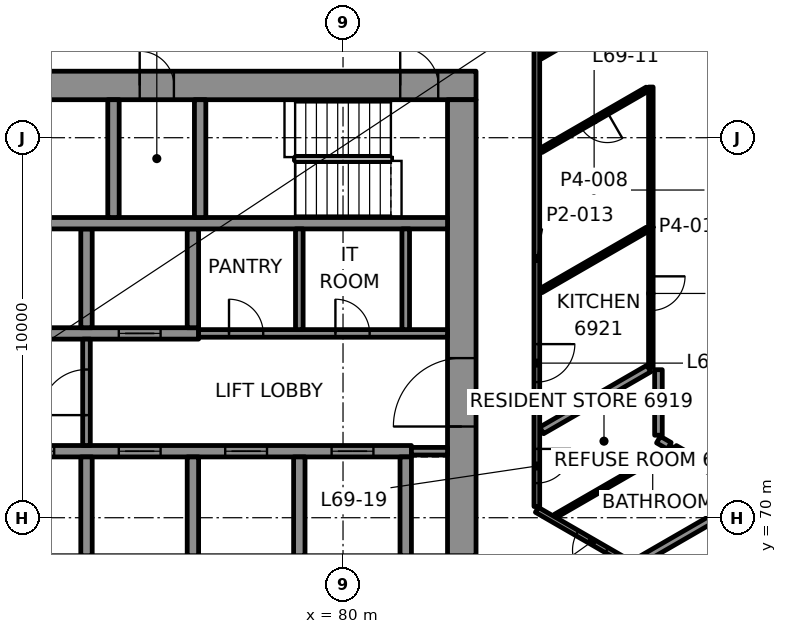
"""IFC4 building model, lengths in metres.
Left out: names, types, materials, properties, quantities, classifications, styles, units other than length and angle.
Written with IfcOpenShell. Run it as: python <this file> out.ifc"""

import sys

from ifc_helpers import new_model, si_unit, direction, frame, frame_2d, origin, place, context, subcontext, project, spatial, rectangle, extrude, element, fill, save


model = new_model("IFC4")
c1 = context("Model", 3, precision=1e-05, world=origin(), true_north=direction((0.0, 1.0)))
c2 = subcontext(c1, "Body", "Model", "MODEL_VIEW")
j1 = project(units=[si_unit("LENGTHUNIT", "METRE"), si_unit("PLANEANGLEUNIT", "RADIAN")], contexts=[c1])
p1 = place(None, origin())
s1 = spatial("IfcSite", under=j1, at=p1, CompositionType="ELEMENT")
p2 = place(p1, origin())
s2 = spatial("IfcBuilding", under=s1, at=p2, CompositionType="ELEMENT")
p3 = place(p2, frame((0.0, 0.0, 288.1)))
s3 = spatial("IfcBuildingStorey", under=s2, at=p3, CompositionType="ELEMENT", Elevation=288.1)
p4 = place(p3, frame((66.5, 81.375, 0.0), z_axis=(0.0, 0.0, 1.0), x_axis=(1.0, 0.0, 0.0)))
e1 = element("IfcWall", 1, at=p4, inside=s3, PredefinedType="SHEAR", context=c2, shape_type="SweptSolid", body=[
    extrude(rectangle(XDim=17.0, YDim=0.75, at=frame_2d((8.5, 0.0))), origin(), (0.0, 0.0, 1.0), 3.3),
])
p5 = place(p4, frame((1.195, 0.0, 0.0)))
e2 = element("IfcOpeningElement", 2, at=p5, cuts=e1, PredefinedType="OPENING", context=c2, shape_type="SweptSolid", body=[
    extrude(rectangle(XDim=1.0, YDim=2.1, at=frame_2d((0.5, 1.05))), frame((0.0, 0.385, 0.0), z_axis=(0.0, -1.0, 0.0), x_axis=(1.0, 0.0, 0.0)), (0.0, 0.0, 1.0), 0.77),
])
p6 = place(p4, frame((15.005, 0.0, 0.0)))
e3 = element("IfcOpeningElement", 3, at=p6, cuts=e1, PredefinedType="OPENING", context=c2, shape_type="SweptSolid", body=[
    extrude(rectangle(XDim=1.0, YDim=2.1, at=frame_2d((0.5, 1.05))), frame((0.0, 0.385, 0.0), z_axis=(0.0, -1.0, 0.0), x_axis=(1.0, 0.0, 0.0)), (0.0, 0.0, 1.0), 0.77),
])
p7 = place(p4, frame((8.15, 0.0, 0.0)))
e4 = element("IfcOpeningElement", 4, at=p7, cuts=e1, PredefinedType="OPENING", context=c2, shape_type="SweptSolid", body=[
    extrude(rectangle(XDim=0.9, YDim=2.1, at=frame_2d((0.45, 1.05))), frame((0.0, 0.385, 0.0), z_axis=(0.0, -1.0, 0.0), x_axis=(1.0, 0.0, 0.0)), (0.0, 0.0, 1.0), 0.77),
])
p8 = place(p3, frame((83.125, 69.0, 0.0), z_axis=(0.0, 0.0, 1.0), x_axis=(0.0, 1.0, 0.0)))
e5 = element("IfcWall", 5, at=p8, inside=s3, PredefinedType="SHEAR", context=c2, shape_type="SweptSolid", body=[
    extrude(rectangle(XDim=12.0, YDim=0.75, at=frame_2d((6.0, 0.0))), origin(), (0.0, 0.0, 1.0), 3.3),
])
p9 = place(p8, frame((3.4, 0.0, 0.0)))
e6 = element("IfcOpeningElement", 6, at=p9, cuts=e5, PredefinedType="OPENING", context=c2, shape_type="SweptSolid", body=[
    extrude(rectangle(XDim=1.8, YDim=2.1, at=frame_2d((0.9, 1.05))), frame((0.0, 0.385, 0.0), z_axis=(0.0, -1.0, 0.0), x_axis=(1.0, 0.0, 0.0)), (0.0, 0.0, 1.0), 0.77),
])
p10 = place(p3, frame((70.3, 71.75, 0.0), z_axis=(0.0, 0.0, 1.0), x_axis=(1.0, 0.0, 0.0)))
e7 = element("IfcWall", 7, at=p10, inside=s3, PredefinedType="SHEAR", context=c2, shape_type="SweptSolid", body=[
    extrude(rectangle(XDim=11.5, YDim=0.3, at=frame_2d((5.75, 0.0))), origin(), (0.0, 0.0, 1.0), 3.3),
])
p11 = place(p10, frame((1.0, 0.0, 0.0)))
e8 = element("IfcOpeningElement", 8, at=p11, cuts=e7, PredefinedType="OPENING", context=c2, shape_type="SweptSolid", body=[
    extrude(rectangle(XDim=1.1, YDim=2.1, at=frame_2d((0.55, 1.05))), frame((0.0, 0.16, 0.0), z_axis=(0.0, -1.0, 0.0), x_axis=(1.0, 0.0, 0.0)), (0.0, 0.0, 1.0), 0.32),
])
p12 = place(p10, frame((3.8, 0.0, 0.0)))
e9 = element("IfcOpeningElement", 9, at=p12, cuts=e7, PredefinedType="OPENING", context=c2, shape_type="SweptSolid", body=[
    extrude(rectangle(XDim=1.1, YDim=2.1, at=frame_2d((0.55, 1.05))), frame((0.0, 0.16, 0.0), z_axis=(0.0, -1.0, 0.0), x_axis=(1.0, 0.0, 0.0)), (0.0, 0.0, 1.0), 0.32),
])
p13 = place(p10, frame((6.6, 0.0, 0.0)))
e10 = element("IfcOpeningElement", 10, at=p13, cuts=e7, PredefinedType="OPENING", context=c2, shape_type="SweptSolid", body=[
    extrude(rectangle(XDim=1.1, YDim=2.1, at=frame_2d((0.55, 1.05))), frame((0.0, 0.16, 0.0), z_axis=(0.0, -1.0, 0.0), x_axis=(1.0, 0.0, 0.0)), (0.0, 0.0, 1.0), 0.32),
])
p14 = place(p10, frame((9.4, 0.0, 0.0)))
e11 = element("IfcOpeningElement", 11, at=p14, cuts=e7, PredefinedType="OPENING", context=c2, shape_type="SweptSolid", body=[
    extrude(rectangle(XDim=1.1, YDim=2.1, at=frame_2d((0.55, 1.05))), frame((0.0, 0.16, 0.0), z_axis=(0.0, -1.0, 0.0), x_axis=(1.0, 0.0, 0.0)), (0.0, 0.0, 1.0), 0.32),
])
p15 = place(p3, frame((70.3, 74.85, 0.0), z_axis=(0.0, 0.0, 1.0), x_axis=(1.0, 0.0, 0.0)))
e12 = element("IfcWall", 12, at=p15, inside=s3, PredefinedType="SHEAR", context=c2, shape_type="SweptSolid", body=[
    extrude(rectangle(XDim=5.9, YDim=0.3, at=frame_2d((2.95, 0.0))), origin(), (0.0, 0.0, 1.0), 3.3),
])
p16 = place(p15, frame((3.8, 0.0, 0.0)))
e13 = element("IfcOpeningElement", 13, at=p16, cuts=e12, PredefinedType="OPENING", context=c2, shape_type="SweptSolid", body=[
    extrude(rectangle(XDim=1.1, YDim=2.1, at=frame_2d((0.55, 1.05))), frame((0.0, 0.16, 0.0), z_axis=(0.0, -1.0, 0.0), x_axis=(1.0, 0.0, 0.0)), (0.0, 0.0, 1.0), 0.32),
])
for number, where, z_axis, x_axis in (
    (14, (73.25, 69.0, 0.0), (0.0, 0.0, 1.0), (0.0, 1.0, 0.0)),
    (15, (73.25, 75.0, 0.0), (0.0, 0.0, 1.0), (0.0, 1.0, 0.0)),
    (16, (76.05, 69.0, 0.0), (0.0, 0.0, 1.0), (0.0, 1.0, 0.0)),
    (17, (76.05, 75.0, 0.0), (0.0, 0.0, 1.0), (0.0, 1.0, 0.0)),
    (18, (78.85, 69.0, 0.0), (0.0, 0.0, 1.0), (0.0, 1.0, 0.0)),
    (19, (81.65, 69.0, 0.0), (0.0, 0.0, 1.0), (0.0, 1.0, 0.0)),
):
    element("IfcWall", number, at=place(p3, frame(where, z_axis=z_axis, x_axis=x_axis)), inside=s3, PredefinedType="SHEAR", context=c2, shape_type="SweptSolid", body=[
        extrude(rectangle(XDim=2.6, YDim=0.3, at=frame_2d((1.3, 0.0))), origin(), (0.0, 0.0, 1.0), 3.3),
    ])
p17 = place(p3, frame((67.25, 77.75, 0.0), z_axis=(0.0, 0.0, 1.0), x_axis=(1.0, 0.0, 0.0)))
e20 = element("IfcWall", 20, at=p17, inside=s3, PredefinedType="SHEAR", context=c2, shape_type="SweptSolid", body=[
    extrude(rectangle(XDim=15.5, YDim=0.3, at=frame_2d((7.75, 0.0))), origin(), (0.0, 0.0, 1.0), 3.3),
])
p18 = place(p17, frame((0.445, 0.0, 0.0)))
e21 = element("IfcOpeningElement", 21, at=p18, cuts=e20, PredefinedType="OPENING", context=c2, shape_type="SweptSolid", body=[
    extrude(rectangle(XDim=1.0, YDim=2.1, at=frame_2d((0.5, 1.05))), frame((0.0, 0.16, 0.0), z_axis=(0.0, -1.0, 0.0), x_axis=(1.0, 0.0, 0.0)), (0.0, 0.0, 1.0), 0.32),
])
for number, where, z_axis, x_axis in (
    (22, (73.96, 77.9, 0.0), (0.0, 0.0, 1.0), (0.0, 1.0, 0.0)),
    (23, (76.24, 77.9, 0.0), (0.0, 0.0, 1.0), (0.0, 1.0, 0.0)),
):
    element("IfcWall", number, at=place(p3, frame(where, z_axis=z_axis, x_axis=x_axis)), inside=s3, PredefinedType="SHEAR", context=c2, shape_type="SweptSolid", body=[
        extrude(rectangle(XDim=3.1, YDim=0.3, at=frame_2d((1.55, 0.0))), origin(), (0.0, 0.0, 1.0), 3.3),
    ])
p19 = place(p3, frame((87.741, 68.83, 0.0), z_axis=(0.0, 0.0, 1.0), x_axis=(0.866026579827, 0.499997963029, 0.0)))
e24 = element("IfcWall", 24, at=p19, inside=s3, PredefinedType="PARTITIONING", context=c2, shape_type="SweptSolid", body=[
    extrude(rectangle(XDim=9.179, YDim=0.2, at=frame_2d((4.59, 0.0))), origin(), (0.0, 0.0, 1.0), 2.688),
])
p20 = place(p3, frame((85.585, 70.045, 0.0), z_axis=(0.0, 0.0, 1.0), x_axis=(0.866004928679, 0.500035462246, 0.0)))
e25 = element("IfcWall", 25, at=p20, inside=s3, PredefinedType="PARTITIONING", context=c2, shape_type="SweptSolid", body=[
    extrude(rectangle(XDim=3.578, YDim=0.1, at=frame_2d((1.789, 0.0))), origin(), (0.0, 0.0, 1.0), 2.7),
])
p21 = place(p3, frame((85.227, 72.297, 0.0), z_axis=(0.0, 0.0, 1.0), x_axis=(0.866002113569, 0.500040337666, 0.0)))
e26 = element("IfcWall", 26, at=p21, inside=s3, PredefinedType="PARTITIONING", context=c2, shape_type="SweptSolid", body=[
    extrude(rectangle(XDim=3.258, YDim=0.2, at=frame_2d((1.629, 0.0))), origin(), (0.0, 0.0, 1.0), 2.7),
])
p22 = place(p3, frame((85.21, 75.976, 0.0), z_axis=(0.0, 0.0, 1.0), x_axis=(0.86605210011, 0.499953757757, 0.0)))
e27 = element("IfcWall", 27, at=p22, inside=s3, PredefinedType="PARTITIONING", context=c2, shape_type="SweptSolid", body=[
    extrude(rectangle(XDim=3.228, YDim=0.12, at=frame_2d((1.614, 0.0))), origin(), (0.0, 0.0, 1.0), 2.7),
])
p23 = place(p3, frame((88.005, 81.279, 0.0), z_axis=(0.0, 0.0, 1.0), x_axis=(-0.866000447062, -0.500043223821, 0.0)))
e28 = element("IfcWall", 28, at=p23, inside=s3, PredefinedType="PARTITIONING", context=c2, shape_type="SweptSolid", body=[
    extrude(rectangle(XDim=3.228, YDim=0.12, at=frame_2d((1.614, 0.0))), origin(), (0.0, 0.0, 1.0), 2.7),
])
p24 = place(p23, frame((1.214, 0.0, 0.0)))
e29 = element("IfcOpeningElement", 29, at=p24, cuts=e28, PredefinedType="OPENING", context=c2, shape_type="SweptSolid", body=[
    extrude(rectangle(XDim=0.8, YDim=2.1, at=frame_2d((0.4, 1.05))), frame((0.0, 0.07, 0.0), z_axis=(0.0, -1.0, 0.0), x_axis=(1.0, 0.0, 0.0)), (0.0, 0.0, 1.0), 0.14),
])
p25 = place(p3, frame((85.201, 82.119, 0.0), z_axis=(0.0, 0.0, 1.0), x_axis=(0.866035297817, 0.499982862641, 0.0)))
e30 = element("IfcWall", 30, at=p25, inside=s3, PredefinedType="PARTITIONING", context=c2, shape_type="SweptSolid", body=[
    extrude(rectangle(XDim=4.734, YDim=0.1, at=frame_2d((2.367, 0.0))), origin(), (0.0, 0.0, 1.0), 2.688),
])
p26 = place(p3, frame((88.3, 72.171, 0.0), z_axis=(0.0, 0.0, 1.0), x_axis=(0.0, 1.0, 0.0)))
e31 = element("IfcWall", 31, at=p26, inside=s3, PredefinedType="PARTITIONING", context=c2, shape_type="SweptSolid", body=[
    extrude(rectangle(XDim=1.724, YDim=0.2, at=frame_2d((0.862, 0.0))), origin(), (0.0, 0.0, 1.0), 2.7),
])
p27 = place(p3, frame((88.1, 81.334, 0.0), z_axis=(0.0, 0.0, 1.0), x_axis=(0.0, -1.0, 0.0)))
e32 = element("IfcWall", 32, at=p27, inside=s3, PredefinedType="PARTITIONING", context=c2, shape_type="SweptSolid", body=[
    extrude(rectangle(XDim=7.378, YDim=0.12, at=frame_2d((3.689, 0.0))), origin(), (0.0, 0.0, 1.0), 2.7),
])
p28 = place(p27, frame((4.982, 0.0, 0.0)))
e33 = element("IfcOpeningElement", 33, at=p28, cuts=e32, PredefinedType="OPENING", context=c2, shape_type="SweptSolid", body=[
    extrude(rectangle(XDim=0.9, YDim=2.1, at=frame_2d((0.45, 1.05))), frame((0.0, 0.07, 0.0), z_axis=(0.0, -1.0, 0.0), x_axis=(1.0, 0.0, 0.0)), (0.0, 0.0, 1.0), 0.14),
])
p29 = place(p3, frame((85.1, 83.348, 0.0), z_axis=(0.0, 0.0, 1.0), x_axis=(0.0, -1.0, 0.0)))
e34 = element("IfcWall", 34, at=p29, inside=s3, PredefinedType="PARTITIONING", context=c2, shape_type="SweptSolid", body=[
    extrude(rectangle(XDim=13.053, YDim=0.15, at=frame_2d((6.527, 0.0))), origin(), (0.0, 0.0, 1.0), 2.7),
])
p30 = place(p29, frame((8.78, 0.0, 0.0)))
e35 = element("IfcOpeningElement", 35, at=p30, cuts=e34, PredefinedType="OPENING", context=c2, shape_type="SweptSolid", body=[
    extrude(rectangle(XDim=1.0, YDim=2.1, at=frame_2d((0.5, 1.05))), frame((0.0, 0.085, 0.0), z_axis=(0.0, -1.0, 0.0), x_axis=(1.0, 0.0, 0.0)), (0.0, 0.0, 1.0), 0.17),
])
p31 = place(p29, frame((11.537, 0.0, 0.0)))
e36 = element("IfcOpeningElement", 36, at=p31, cuts=e34, PredefinedType="OPENING", context=c2, shape_type="SweptSolid", body=[
    extrude(rectangle(XDim=0.9, YDim=2.1, at=frame_2d((0.45, 1.05))), frame((0.0, 0.085, 0.0), z_axis=(0.0, -1.0, 0.0), x_axis=(1.0, 0.0, 0.0)), (0.0, 0.0, 1.0), 0.17),
])
p32 = place(p3, frame((90.662, 70.692, 0.0), z_axis=(0.0, 0.0, 1.0), x_axis=(-0.866034963436, 0.499983441833, 0.0)))
e37 = element("IfcWall", 37, at=p32, inside=s3, PredefinedType="PARTITIONING", context=c2, shape_type="SweptSolid", body=[
    extrude(rectangle(XDim=2.24, YDim=0.2, at=frame_2d((1.12, 0.0))), origin(), (0.0, 0.0, 1.0), 2.7),
])
p33 = place(p3, frame((97.014, 63.329, 0.0), z_axis=(0.0, 0.0, 1.0), x_axis=(-0.866023045711, 0.500004084281, 0.0)))
e38 = element("IfcWall", 38, at=p33, inside=s3, PredefinedType="PARTITIONING", context=c2, shape_type="SweptSolid", body=[
    extrude(rectangle(XDim=13.757, YDim=0.15, at=frame_2d((6.879, 0.0))), origin(), (0.0, 0.0, 1.0), 2.7),
])
p34 = place(p33, frame((1.39, 0.0, 0.0)))
e39 = element("IfcOpeningElement", 39, at=p34, cuts=e38, PredefinedType="OPENING", context=c2, shape_type="SweptSolid", body=[
    extrude(rectangle(XDim=0.9, YDim=2.1, at=frame_2d((0.45, 1.05))), frame((0.0, 0.085, 0.0), z_axis=(0.0, -1.0, 0.0), x_axis=(1.0, 0.0, 0.0)), (0.0, 0.0, 1.0), 0.17),
])
p35 = place(p33, frame((4.821, 0.0, 0.0)))
e40 = element("IfcOpeningElement", 40, at=p35, cuts=e38, PredefinedType="OPENING", context=c2, shape_type="SweptSolid", body=[
    extrude(rectangle(XDim=1.0, YDim=2.1, at=frame_2d((0.5, 1.05))), frame((0.0, 0.085, 0.0), z_axis=(0.0, -1.0, 0.0), x_axis=(1.0, 0.0, 0.0)), (0.0, 0.0, 1.0), 0.17),
])
p36 = place(p33, frame((11.634, 0.0, 0.0)))
e41 = element("IfcOpeningElement", 41, at=p36, cuts=e38, PredefinedType="OPENING", context=c2, shape_type="SweptSolid", body=[
    extrude(rectangle(XDim=0.9, YDim=2.1, at=frame_2d((0.45, 1.05))), frame((0.0, 0.085, 0.0), z_axis=(0.0, -1.0, 0.0), x_axis=(1.0, 0.0, 0.0)), (0.0, 0.0, 1.0), 0.17),
])
p37 = place(p3, frame((88.584, 71.892, 0.0), z_axis=(0.0, 0.0, 1.0), x_axis=(-0.865987003449, 0.500066505434, 0.0)))
e42 = element("IfcWall", 42, at=p37, inside=s3, PredefinedType="PARTITIONING", context=c2, shape_type="SweptSolid", body=[
    extrude(rectangle(XDim=0.328, YDim=0.2, at=frame_2d((0.164, 0.0))), origin(), (0.0, 0.0, 1.0), 2.7),
])
p38 = place(p3, frame((81.8, 71.75, 0.0), z_axis=(0.0, 0.0, 1.0), x_axis=(1.0, 0.0, 0.0)))
e43 = element("IfcWall", 43, at=p38, inside=s3, PredefinedType="PARTITIONING", context=c2, shape_type="SweptSolid", body=[
    extrude(rectangle(XDim=0.95, YDim=0.2, at=frame_2d((0.475, 0.0))), origin(), (0.0, 0.0, 1.0), 3.3),
])
p39 = place(p3, frame((76.2, 74.85, 0.0), z_axis=(0.0, 0.0, 1.0), x_axis=(1.0, 0.0, 0.0)))
e44 = element("IfcWall", 44, at=p39, inside=s3, PredefinedType="PARTITIONING", context=c2, shape_type="SweptSolid", body=[
    extrude(rectangle(XDim=6.55, YDim=0.2, at=frame_2d((3.275, 0.0))), origin(), (0.0, 0.0, 1.0), 3.3),
])
p40 = place(p39, frame((0.8, 0.0, 0.0)))
e45 = element("IfcOpeningElement", 45, at=p40, cuts=e44, PredefinedType="OPENING", context=c2, shape_type="SweptSolid", body=[
    extrude(rectangle(XDim=0.9, YDim=2.1, at=frame_2d((0.45, 1.05))), frame((0.0, 0.11, 0.0), z_axis=(0.0, -1.0, 0.0), x_axis=(1.0, 0.0, 0.0)), (0.0, 0.0, 1.0), 0.22),
])
p41 = place(p39, frame((3.6, 0.0, 0.0)))
e46 = element("IfcOpeningElement", 46, at=p41, cuts=e44, PredefinedType="OPENING", context=c2, shape_type="SweptSolid", body=[
    extrude(rectangle(XDim=0.9, YDim=2.1, at=frame_2d((0.45, 1.05))), frame((0.0, 0.11, 0.0), z_axis=(0.0, -1.0, 0.0), x_axis=(1.0, 0.0, 0.0)), (0.0, 0.0, 1.0), 0.22),
])
p42 = place(p3, frame((73.25, 71.9, 0.0), z_axis=(0.0, 0.0, 1.0), x_axis=(0.0, 1.0, 0.0)))
e47 = element("IfcWall", 47, at=p42, inside=s3, PredefinedType="PARTITIONING", context=c2, shape_type="SweptSolid", body=[
    extrude(rectangle(XDim=2.8, YDim=0.2, at=frame_2d((1.4, 0.0))), origin(), (0.0, 0.0, 1.0), 3.3),
])
p43 = place(p42, frame((0.8, 0.0, 0.0)))
e48 = element("IfcOpeningElement", 48, at=p43, cuts=e47, PredefinedType="OPENING", context=c2, shape_type="SweptSolid", body=[
    extrude(rectangle(XDim=1.2, YDim=2.1, at=frame_2d((0.6, 1.05))), frame((0.0, 0.11, 0.0), z_axis=(0.0, -1.0, 0.0), x_axis=(1.0, 0.0, 0.0)), (0.0, 0.0, 1.0), 0.22),
])
for number, where, z_axis, x_axis in (
    (49, (78.85, 74.95, 0.0), (0.0, 0.0, 1.0), (0.0, 1.0, 0.0)),
    (50, (81.65, 74.95, 0.0), (0.0, 0.0, 1.0), (0.0, 1.0, 0.0)),
):
    element("IfcWall", number, at=place(p3, frame(where, z_axis=z_axis, x_axis=x_axis)), inside=s3, PredefinedType="PARTITIONING", context=c2, shape_type="SweptSolid", body=[
        extrude(rectangle(XDim=2.65, YDim=0.2, at=frame_2d((1.325, 0.0))), origin(), (0.0, 0.0, 1.0), 3.3),
    ])
p44 = place(p24, origin())
e51 = element("IfcDoor", 51, at=p44, inside=s3, OperationType="SINGLE_SWING_RIGHT", PredefinedType="DOOR", context=c2, shape_type="SweptSolid", body=[
    extrude(rectangle(XDim=0.8, YDim=2.1, at=frame_2d((0.4, 1.05))), frame((0.0, 0.025, 0.0), z_axis=(0.0, -1.0, 0.0), x_axis=(1.0, 0.0, 0.0)), (0.0, 0.0, 1.0), 0.05),
])
fill(e29, e51)
p45 = place(p28, origin())
e52 = element("IfcDoor", 52, at=p45, inside=s3, OperationType="SINGLE_SWING_RIGHT", PredefinedType="DOOR", context=c2, shape_type="SweptSolid", body=[
    extrude(rectangle(XDim=0.9, YDim=2.1, at=frame_2d((0.45, 1.05))), frame((0.0, 0.025, 0.0), z_axis=(0.0, -1.0, 0.0), x_axis=(1.0, 0.0, 0.0)), (0.0, 0.0, 1.0), 0.05),
])
fill(e33, e52)
p46 = place(p30, origin())
e53 = element("IfcDoor", 53, at=p46, inside=s3, OperationType="SINGLE_SWING_LEFT", PredefinedType="DOOR", context=c2, shape_type="SweptSolid", body=[
    extrude(rectangle(XDim=1.0, YDim=2.1, at=frame_2d((0.5, 1.05))), frame((0.0, 0.025, 0.0), z_axis=(0.0, -1.0, 0.0), x_axis=(1.0, 0.0, 0.0)), (0.0, 0.0, 1.0), 0.05),
])
fill(e35, e53)
p47 = place(p31, origin())
e54 = element("IfcDoor", 54, at=p47, inside=s3, OperationType="SINGLE_SWING_LEFT", PredefinedType="DOOR", context=c2, shape_type="SweptSolid", body=[
    extrude(rectangle(XDim=0.9, YDim=2.1, at=frame_2d((0.45, 1.05))), frame((0.0, 0.025, 0.0), z_axis=(0.0, -1.0, 0.0), x_axis=(1.0, 0.0, 0.0)), (0.0, 0.0, 1.0), 0.05),
])
fill(e36, e54)
p48 = place(p36, origin())
e55 = element("IfcDoor", 55, at=p48, inside=s3, OperationType="SINGLE_SWING_LEFT", PredefinedType="DOOR", context=c2, shape_type="SweptSolid", body=[
    extrude(rectangle(XDim=0.9, YDim=2.1, at=frame_2d((0.45, 1.05))), frame((0.0, 0.025, 0.0), z_axis=(0.0, -1.0, 0.0), x_axis=(1.0, 0.0, 0.0)), (0.0, 0.0, 1.0), 0.05),
])
fill(e41, e55)
p49 = place(p11, origin())
e56 = element("IfcDoor", 56, at=p49, inside=s3, OperationType="DOUBLE_DOOR_SLIDING", PredefinedType="DOOR", context=c2, shape_type="SweptSolid", body=[
    extrude(rectangle(XDim=1.1, YDim=2.1, at=frame_2d((0.55, 1.05))), frame((0.0, 0.025, 0.0), z_axis=(0.0, -1.0, 0.0), x_axis=(1.0, 0.0, 0.0)), (0.0, 0.0, 1.0), 0.05),
])
fill(e8, e56)
p50 = place(p12, origin())
e57 = element("IfcDoor", 57, at=p50, inside=s3, OperationType="DOUBLE_DOOR_SLIDING", PredefinedType="DOOR", context=c2, shape_type="SweptSolid", body=[
    extrude(rectangle(XDim=1.1, YDim=2.1, at=frame_2d((0.55, 1.05))), frame((0.0, 0.025, 0.0), z_axis=(0.0, -1.0, 0.0), x_axis=(1.0, 0.0, 0.0)), (0.0, 0.0, 1.0), 0.05),
])
fill(e9, e57)
p51 = place(p13, origin())
e58 = element("IfcDoor", 58, at=p51, inside=s3, OperationType="DOUBLE_DOOR_SLIDING", PredefinedType="DOOR", context=c2, shape_type="SweptSolid", body=[
    extrude(rectangle(XDim=1.1, YDim=2.1, at=frame_2d((0.55, 1.05))), frame((0.0, 0.025, 0.0), z_axis=(0.0, -1.0, 0.0), x_axis=(1.0, 0.0, 0.0)), (0.0, 0.0, 1.0), 0.05),
])
fill(e10, e58)
p52 = place(p14, origin())
e59 = element("IfcDoor", 59, at=p52, inside=s3, OperationType="DOUBLE_DOOR_SLIDING", PredefinedType="DOOR", context=c2, shape_type="SweptSolid", body=[
    extrude(rectangle(XDim=1.1, YDim=2.1, at=frame_2d((0.55, 1.05))), frame((0.0, 0.025, 0.0), z_axis=(0.0, -1.0, 0.0), x_axis=(1.0, 0.0, 0.0)), (0.0, 0.0, 1.0), 0.05),
])
fill(e11, e59)
p53 = place(p16, origin())
e60 = element("IfcDoor", 60, at=p53, inside=s3, OperationType="DOUBLE_DOOR_SLIDING", PredefinedType="DOOR", context=c2, shape_type="SweptSolid", body=[
    extrude(rectangle(XDim=1.1, YDim=2.1, at=frame_2d((0.55, 1.05))), frame((0.0, 0.025, 0.0), z_axis=(0.0, -1.0, 0.0), x_axis=(1.0, 0.0, 0.0)), (0.0, 0.0, 1.0), 0.05),
])
fill(e13, e60)
p54 = place(p6, origin())
e61 = element("IfcDoor", 61, at=p54, inside=s3, OperationType="SINGLE_SWING_LEFT", PredefinedType="DOOR", context=c2, shape_type="SweptSolid", body=[
    extrude(rectangle(XDim=1.0, YDim=2.1, at=frame_2d((0.5, 1.05))), frame((0.0, 0.095, 0.0), z_axis=(0.0, -1.0, 0.0), x_axis=(1.0, 0.0, 0.0)), (0.0, 0.0, 1.0), 0.19),
])
fill(e3, e61)
p55 = place(p43, origin())
e62 = element("IfcDoor", 62, at=p55, inside=s3, OperationType="SINGLE_SWING_LEFT", PredefinedType="DOOR", context=c2, shape_type="SweptSolid", body=[
    extrude(rectangle(XDim=1.2, YDim=2.1, at=frame_2d((0.6, 1.05))), frame((0.0, 0.025, 0.0), z_axis=(0.0, -1.0, 0.0), x_axis=(1.0, 0.0, 0.0)), (0.0, 0.0, 1.0), 0.05),
])
fill(e48, e62)
p56 = place(p9, origin())
e63 = element("IfcDoor", 63, at=p56, inside=s3, OperationType="SINGLE_SWING_LEFT", PredefinedType="DOOR", context=c2, shape_type="SweptSolid", body=[
    extrude(rectangle(XDim=1.8, YDim=2.1, at=frame_2d((0.9, 1.05))), frame((0.0, 0.095, 0.0), z_axis=(0.0, -1.0, 0.0), x_axis=(1.0, 0.0, 0.0)), (0.0, 0.0, 1.0), 0.19),
])
fill(e6, e63)
p57 = place(p40, origin())
e64 = element("IfcDoor", 64, at=p57, inside=s3, OperationType="SINGLE_SWING_RIGHT", PredefinedType="DOOR", context=c2, shape_type="SweptSolid", body=[
    extrude(rectangle(XDim=0.9, YDim=2.1, at=frame_2d((0.45, 1.05))), frame((0.0, 0.025, 0.0), z_axis=(0.0, -1.0, 0.0), x_axis=(1.0, 0.0, 0.0)), (0.0, 0.0, 1.0), 0.05),
])
fill(e45, e64)
p58 = place(p41, origin())
e65 = element("IfcDoor", 65, at=p58, inside=s3, OperationType="SINGLE_SWING_LEFT", PredefinedType="DOOR", context=c2, shape_type="SweptSolid", body=[
    extrude(rectangle(XDim=0.9, YDim=2.1, at=frame_2d((0.45, 1.05))), frame((0.0, 0.025, 0.0), z_axis=(0.0, -1.0, 0.0), x_axis=(1.0, 0.0, 0.0)), (0.0, 0.0, 1.0), 0.05),
])
fill(e46, e65)
p59 = place(p7, origin())
e66 = element("IfcDoor", 66, at=p59, inside=s3, OperationType="SINGLE_SWING_RIGHT", PredefinedType="DOOR", context=c2, shape_type="SweptSolid", body=[
    extrude(rectangle(XDim=0.9, YDim=2.1, at=frame_2d((0.45, 1.05))), frame((0.0, 0.095, 0.0), z_axis=(0.0, -1.0, 0.0), x_axis=(1.0, 0.0, 0.0)), (0.0, 0.0, 1.0), 0.19),
])
fill(e4, e66)
save(model, sys.argv[1])
